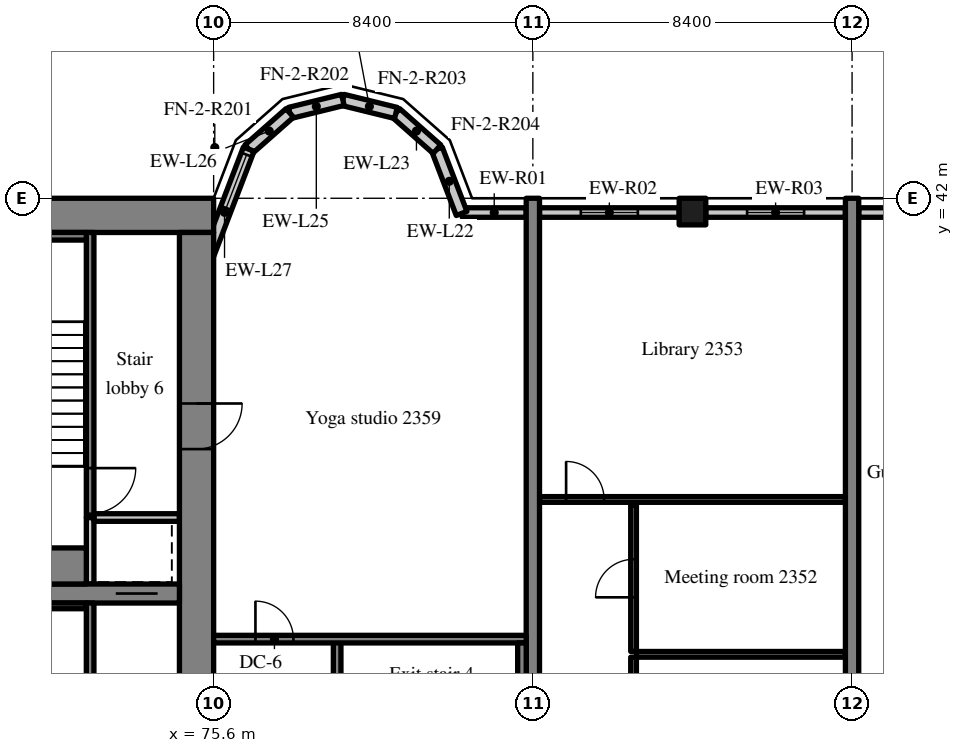
"""IFC4 building model, lengths in metres.
Left out: names, types, materials, properties, quantities, classifications, styles, units other than length and angle.
Written with IfcOpenShell. Run it as: python <this file> out.ifc"""

import sys

from ifc_helpers import new_model, si_unit, direction, frame, frame_2d, origin, origin_2d, place, context, subcontext, project, spatial, rectangle, extrude, source, transform, mapped, element, fill, save


model = new_model("IFC4")
c1 = context("Model", 3, precision=1e-05, world=origin(), true_north=direction((0.0, 1.0)))
c2 = subcontext(c1, "Body", "Model", "MODEL_VIEW")
j1 = project(units=[si_unit("LENGTHUNIT", "METRE"), si_unit("PLANEANGLEUNIT", "RADIAN")], contexts=[c1])
p1 = place(None, origin())
s1 = spatial("IfcSite", under=j1, at=p1, CompositionType="ELEMENT")
p2 = place(p1, origin())
s2 = spatial("IfcBuilding", under=s1, at=p2, CompositionType="ELEMENT")
p3 = place(p2, frame((0.0, 0.0, 99.0)))
s3 = spatial("IfcBuildingStorey", under=s2, at=p3, CompositionType="ELEMENT", Elevation=99.0)
m1 = source(origin(), c2, "Body", "SweptSolid", [
    extrude(rectangle(XDim=50.4, YDim=0.9, at=frame_2d((25.2, 0.0))), origin(), (0.0, 0.0, 1.0), 3.52),
])
p4 = place(p3, frame((25.2, 41.55, 0.0), z_axis=(0.0, 0.0, 1.0), x_axis=(1.0, 0.0, 0.0)))
e1 = element("IfcWall", 1, at=p4, inside=s3, PredefinedType="SHEAR", context=c2, shape_type="MappedRepresentation", body=[
    mapped(m1, transform((0.0, 0.0, 0.0), scale=1.0)),
])
m2 = source(origin(), c2, "Body", "SweptSolid", [
    extrude(rectangle(XDim=18.2, YDim=0.9, at=frame_2d((9.1, 0.0))), origin(), (0.0, 0.0, 1.0), 3.52),
])
p5 = place(p3, frame((75.15, 22.9, 0.0), z_axis=(0.0, 0.0, 1.0), x_axis=(0.0, 1.0, 0.0)))
e2 = element("IfcWall", 2, at=p5, inside=s3, PredefinedType="SHEAR", context=c2, shape_type="MappedRepresentation", body=[
    mapped(m2, transform((0.0, 0.0, 0.0), scale=1.0)),
])
m3 = source(origin(), c2, "Body", "SweptSolid", [
    extrude(rectangle(XDim=1.2, YDim=2.1, at=frame_2d((0.6, 1.05))), frame((0.0, 0.46, 0.0), z_axis=(0.0, -1.0, 0.0), x_axis=(1.0, 0.0, 0.0)), (0.0, 0.0, 1.0), 0.92),
])
p6 = place(p5, frame((12.5, 0.0, 0.0)))
e3 = element("IfcOpeningElement", 3, at=p6, cuts=e2, PredefinedType="OPENING", context=c2, shape_type="MappedRepresentation", body=[
    mapped(m3, transform((0.0, 0.0, 0.0), scale=1.0)),
])
m4 = source(origin(), c2, "Body", "SweptSolid", [
    extrude(rectangle(XDim=7.25, YDim=0.5, at=frame_2d((3.625, 0.0))), origin(), (0.0, 0.0, 1.0), 3.52),
])
p7 = place(p3, frame((67.45, 31.6, 0.0), z_axis=(0.0, 0.0, 1.0), x_axis=(1.0, 0.0, 0.0)))
e4 = element("IfcWall", 4, at=p7, inside=s3, PredefinedType="SHEAR", context=c2, shape_type="MappedRepresentation", body=[
    mapped(m4, transform((0.0, 0.0, 0.0), scale=1.0)),
])
m5 = source(origin(), c2, "Body", "SweptSolid", [
    extrude(rectangle(XDim=1.1, YDim=2.1, at=frame_2d((0.55, 1.05))), frame((0.0, 0.26, 0.0), z_axis=(0.0, -1.0, 0.0), x_axis=(1.0, 0.0, 0.0)), (0.0, 0.0, 1.0), 0.52),
])
p8 = place(p7, frame((5.575, 0.0, 0.0)))
e5 = element("IfcOpeningElement", 5, at=p8, cuts=e4, PredefinedType="OPENING", context=c2, shape_type="MappedRepresentation", body=[
    mapped(m5, transform((0.0, 0.0, 0.0), scale=1.0)),
])
m6 = source(origin(), c2, "Body", "SweptSolid", [
    extrude(rectangle(XDim=20.0, YDim=0.35, at=frame_2d((10.0, 0.0))), origin(), (0.0, 0.0, 1.0), 3.52),
])
for number, where, z_axis, x_axis in (
    (6, (84.0, 22.0, 0.0), (0.0, 0.0, 1.0), (0.0, 1.0, 0.0)),
    (7, (92.4, 22.0, 0.0), (0.0, 0.0, 1.0), (0.0, 1.0, 0.0)),
):
    element("IfcWall", number, at=place(p3, frame(where, z_axis=z_axis, x_axis=x_axis)), inside=s3, PredefinedType="SHEAR", context=c2, shape_type="MappedRepresentation", body=[
        mapped(m6, transform((0.0, 0.0, 0.0), scale=1.0)),
    ])
m7 = source(origin(), c2, "Body", "SweptSolid", [
    extrude(rectangle(XDim=0.7, YDim=0.7, at=origin_2d()), origin(), (0.0, 0.0, 1.0), 3.52),
])
p9 = place(p3, frame((88.2, 41.65, 0.0), z_axis=(0.0, 0.0, 1.0), x_axis=(1.0, 0.0, 0.0)))
e8 = element("IfcColumn", 8, at=p9, inside=s3, PredefinedType="COLUMN", context=c2, shape_type="MappedRepresentation", body=[
    mapped(m7, transform((0.0, 0.0, 0.0), scale=1.0)),
])
m8 = source(origin(), c2, "Body", "SweptSolid", [
    extrude(rectangle(XDim=1.683, YDim=0.25, at=frame_2d((0.841, 0.0))), origin(), (0.0, 0.0, 1.0), 2.82),
])
p10 = place(p3, frame((83.825, 41.625, 0.0), z_axis=(0.0, 0.0, 1.0), x_axis=(-1.0, 0.0, 0.0)))
e9 = element("IfcWall", 9, at=p10, inside=s3, PredefinedType="SOLIDWALL", context=c2, shape_type="MappedRepresentation", body=[
    mapped(m8, transform((0.0, 0.0, 0.0), scale=1.0)),
])
m9 = source(origin(), c2, "Body", "SweptSolid", [
    extrude(rectangle(XDim=3.675, YDim=0.25, at=frame_2d((1.837, 0.0))), origin(), (0.0, 0.0, 1.0), 2.82),
])
p11 = place(p3, frame((87.85, 41.625, 0.0), z_axis=(0.0, 0.0, 1.0), x_axis=(-1.0, 0.0, 0.0)))
e10 = element("IfcWall", 10, at=p11, inside=s3, PredefinedType="SOLIDWALL", context=c2, shape_type="MappedRepresentation", body=[
    mapped(m9, transform((0.0, 0.0, 0.0), scale=1.0)),
])
m10 = source(origin(), c2, "Body", "SweptSolid", [
    extrude(rectangle(XDim=1.5, YDim=1.5, at=frame_2d((0.75, 0.75))), frame((0.0, 0.135, 0.0), z_axis=(0.0, -1.0, 0.0), x_axis=(1.0, 0.0, 0.0)), (0.0, 0.0, 1.0), 0.27),
])
p12 = place(p11, frame((1.087, 0.0, 0.9)))
e11 = element("IfcOpeningElement", 11, at=p12, cuts=e10, PredefinedType="OPENING", context=c2, shape_type="MappedRepresentation", body=[
    mapped(m10, transform((0.0, 0.0, 0.0), scale=1.0)),
])
p13 = place(p3, frame((92.225, 41.625, 0.0), z_axis=(0.0, 0.0, 1.0), x_axis=(-1.0, 0.0, 0.0)))
e12 = element("IfcWall", 12, at=p13, inside=s3, PredefinedType="SOLIDWALL", context=c2, shape_type="MappedRepresentation", body=[
    mapped(m9, transform((0.0, 0.0, 0.0), scale=1.0)),
])
p14 = place(p13, frame((1.087, 0.0, 0.9)))
e13 = element("IfcOpeningElement", 13, at=p14, cuts=e12, PredefinedType="OPENING", context=c2, shape_type="MappedRepresentation", body=[
    mapped(m10, transform((0.0, 0.0, 0.0), scale=1.0)),
])
m11 = source(origin(), c2, "Body", "SweptSolid", [
    extrude(rectangle(XDim=4.07, YDim=0.25, at=frame_2d((2.035, 0.0))), origin(), (0.0, 0.0, 1.0), 2.82),
])
p15 = place(p3, frame((96.645, 41.625, 0.0), z_axis=(0.0, 0.0, 1.0), x_axis=(-1.0, 0.0, 0.0)))
e14 = element("IfcWall", 14, at=p15, inside=s3, PredefinedType="SOLIDWALL", context=c2, shape_type="MappedRepresentation", body=[
    mapped(m11, transform((0.0, 0.0, 0.0), scale=1.0)),
])
p16 = place(p15, frame((1.285, 0.0, 0.9)))
e15 = element("IfcOpeningElement", 15, at=p16, cuts=e14, PredefinedType="OPENING", context=c2, shape_type="MappedRepresentation", body=[
    mapped(m10, transform((0.0, 0.0, 0.0), scale=1.0)),
])
m12 = source(origin(), c2, "Body", "SweptSolid", [
    extrude(rectangle(XDim=1.812, YDim=0.3, at=frame_2d((0.906, 0.0))), origin(), (0.0, 0.0, 1.0), 3.52),
])
p17 = place(p3, frame((82.125, 41.6, 0.0), z_axis=(0.0, 0.0, 1.0), x_axis=(-0.357877270961, 0.93376863244, 0.0)))
e16 = element("IfcWall", 16, at=p17, inside=s3, PredefinedType="SOLIDWALL", context=c2, shape_type="MappedRepresentation", body=[
    mapped(m12, transform((0.0, 0.0, 0.0), scale=1.0)),
])
m13 = source(origin(), c2, "Body", "SweptSolid", [
    extrude(rectangle(XDim=1.44, YDim=0.3, at=frame_2d((0.72, 0.0))), origin(), (0.0, 0.0, 1.0), 3.52),
])
p18 = place(p3, frame((81.477, 43.292, 0.0), z_axis=(0.0, 0.0, 1.0), x_axis=(-0.74957555648, 0.661918790432, 0.0)))
e17 = element("IfcWall", 17, at=p18, inside=s3, PredefinedType="SOLIDWALL", context=c2, shape_type="MappedRepresentation", body=[
    mapped(m13, transform((0.0, 0.0, 0.0), scale=1.0)),
])
m14 = source(origin(), c2, "Body", "SweptSolid", [
    extrude(rectangle(XDim=1.439, YDim=0.3, at=frame_2d((0.719, 0.0))), origin(), (0.0, 0.0, 1.0), 3.52),
])
for number, where, z_axis, x_axis in (
    (18, (80.397, 44.245, 0.0), (0.0, 0.0, 1.0), (-0.971, 0.238, 0.0)),
    (19, (79.0, 44.588, 0.0), (0.0, 0.0, 1.0), (-0.971, -0.238, 0.0)),
):
    element("IfcWall", number, at=place(p3, frame(where, z_axis=z_axis, x_axis=x_axis)), inside=s3, PredefinedType="SOLIDWALL", context=c2, shape_type="MappedRepresentation", body=[
        mapped(m14, transform((0.0, 0.0, 0.0), scale=1.0)),
    ])
p19 = place(p3, frame((77.603, 44.245, 0.0), z_axis=(0.0, 0.0, 1.0), x_axis=(-0.74957555648, -0.661918790432, 0.0)))
e20 = element("IfcWall", 20, at=p19, inside=s3, PredefinedType="SOLIDWALL", context=c2, shape_type="MappedRepresentation", body=[
    mapped(m13, transform((0.0, 0.0, 0.0), scale=1.0)),
])
m15 = source(origin(), c2, "Body", "SweptSolid", [
    extrude(rectangle(XDim=3.559, YDim=0.3, at=frame_2d((1.78, 0.0))), origin(), (0.0, 0.0, 1.0), 3.52),
])
p20 = place(p3, frame((76.523, 43.292, 0.0), z_axis=(0.0, 0.0, 1.0), x_axis=(-0.35779745313, -0.933799219604, 0.0)))
e21 = element("IfcWall", 21, at=p20, inside=s3, PredefinedType="SOLIDWALL", context=c2, shape_type="MappedRepresentation", body=[
    mapped(m15, transform((0.0, 0.0, 0.0), scale=1.0)),
])
m16 = source(origin(), c2, "Body", "SweptSolid", [
    extrude(rectangle(XDim=1.5, YDim=2.0, at=frame_2d((0.75, 1.0))), frame((0.0, 0.16, 0.0), z_axis=(0.0, -1.0, 0.0), x_axis=(1.0, 0.0, 0.0)), (0.0, 0.0, 1.0), 0.32),
])
p21 = place(p20, frame((0.156, 0.0, 0.9)))
e22 = element("IfcOpeningElement", 22, at=p21, cuts=e21, PredefinedType="OPENING", context=c2, shape_type="MappedRepresentation", body=[
    mapped(m16, transform((0.0, 0.0, 0.0), scale=1.0)),
])
m17 = source(origin(), c2, "Body", "SweptSolid", [
    extrude(rectangle(XDim=8.45, YDim=0.2, at=frame_2d((4.225, 0.0))), origin(), (0.0, 0.0, 1.0), 3.52),
])
p22 = place(p3, frame((72.35, 22.9, 0.0), z_axis=(0.0, 0.0, 1.0), x_axis=(0.0, 1.0, 0.0)))
e23 = element("IfcWall", 23, at=p22, inside=s3, PredefinedType="SOLIDWALL", context=c2, shape_type="MappedRepresentation", body=[
    mapped(m17, transform((0.0, 0.0, 0.0), scale=1.0)),
])
m18 = source(origin(), c2, "Body", "SweptSolid", [
    extrude(rectangle(XDim=1.2, YDim=2.1, at=frame_2d((0.6, 1.05))), frame((0.0, 0.11, 0.0), z_axis=(0.0, -1.0, 0.0), x_axis=(1.0, 0.0, 0.0)), (0.0, 0.0, 1.0), 0.22),
])
p23 = place(p22, frame((0.7, 0.0, 0.0)))
e24 = element("IfcOpeningElement", 24, at=p23, cuts=e23, PredefinedType="OPENING", context=c2, shape_type="MappedRepresentation", body=[
    mapped(m18, transform((0.0, 0.0, 0.0), scale=1.0)),
])
m19 = source(origin(), c2, "Body", "SweptSolid", [
    extrude(rectangle(XDim=1.75, YDim=0.2, at=frame_2d((0.875, 0.0))), origin(), (0.0, 0.0, 1.0), 3.52),
])
p24 = place(p3, frame((72.35, 31.85, 0.0), z_axis=(0.0, 0.0, 1.0), x_axis=(0.0, 1.0, 0.0)))
e25 = element("IfcWall", 25, at=p24, inside=s3, PredefinedType="SOLIDWALL", context=c2, shape_type="MappedRepresentation", body=[
    mapped(m19, transform((0.0, 0.0, 0.0), scale=1.0)),
])
m20 = source(origin(), c2, "Body", "SweptSolid", [
    extrude(rectangle(XDim=2.25, YDim=0.2, at=frame_2d((1.125, 0.0))), origin(), (0.0, 0.0, 1.0), 3.52),
])
p25 = place(p3, frame((72.45, 33.6, 0.0), z_axis=(0.0, 0.0, 1.0), x_axis=(1.0, 0.0, 0.0)))
e26 = element("IfcWall", 26, at=p25, inside=s3, PredefinedType="SOLIDWALL", context=c2, shape_type="MappedRepresentation", body=[
    mapped(m20, transform((0.0, 0.0, 0.0), scale=1.0)),
])
m21 = source(origin(), c2, "Body", "SweptSolid", [
    extrude(rectangle(XDim=7.5, YDim=0.2, at=frame_2d((3.75, 0.0))), origin(), (0.0, 0.0, 1.0), 3.52),
])
p26 = place(p3, frame((72.35, 33.6, 0.0), z_axis=(0.0, 0.0, 1.0), x_axis=(0.0, 1.0, 0.0)))
e27 = element("IfcWall", 27, at=p26, inside=s3, PredefinedType="SOLIDWALL", context=c2, shape_type="MappedRepresentation", body=[
    mapped(m21, transform((0.0, 0.0, 0.0), scale=1.0)),
])
p27 = place(p26, frame((0.1, 0.0, 0.0)))
e28 = element("IfcOpeningElement", 28, at=p27, cuts=e27, PredefinedType="OPENING", context=c2, shape_type="MappedRepresentation", body=[
    mapped(m18, transform((0.0, 0.0, 0.0), scale=1.0)),
])
m22 = source(origin(), c2, "Body", "SweptSolid", [
    extrude(rectangle(XDim=8.3, YDim=0.2, at=frame_2d((4.15, 0.0))), origin(), (0.0, 0.0, 1.0), 3.52),
])
p28 = place(p3, frame((78.85, 22.1, 0.0), z_axis=(0.0, 0.0, 1.0), x_axis=(0.0, 1.0, 0.0)))
e29 = element("IfcWall", 29, at=p28, inside=s3, PredefinedType="SOLIDWALL", context=c2, shape_type="MappedRepresentation", body=[
    mapped(m22, transform((0.0, 0.0, 0.0), scale=1.0)),
])
p29 = place(p28, frame((0.6, 0.0, 0.0)))
e30 = element("IfcOpeningElement", 30, at=p29, cuts=e29, PredefinedType="OPENING", context=c2, shape_type="MappedRepresentation", body=[
    mapped(m18, transform((0.0, 0.0, 0.0), scale=1.0)),
])
m23 = source(origin(), c2, "Body", "SweptSolid", [
    extrude(rectangle(XDim=8.225, YDim=0.2, at=frame_2d((4.112, 0.0))), origin(), (0.0, 0.0, 1.0), 3.52),
])
p30 = place(p3, frame((83.825, 30.4, 0.0), z_axis=(0.0, 0.0, 1.0), x_axis=(-1.0, 0.0, 0.0)))
e31 = element("IfcWall", 31, at=p30, inside=s3, PredefinedType="SOLIDWALL", context=c2, shape_type="MappedRepresentation", body=[
    mapped(m23, transform((0.0, 0.0, 0.0), scale=1.0)),
])
m24 = source(origin(), c2, "Body", "SweptSolid", [
    extrude(rectangle(XDim=1.0, YDim=2.1, at=frame_2d((0.5, 1.05))), frame((0.0, 0.11, 0.0), z_axis=(0.0, -1.0, 0.0), x_axis=(1.0, 0.0, 0.0)), (0.0, 0.0, 1.0), 0.22),
])
p31 = place(p30, frame((6.125, 0.0, 0.0)))
e32 = element("IfcOpeningElement", 32, at=p31, cuts=e31, PredefinedType="OPENING", context=c2, shape_type="MappedRepresentation", body=[
    mapped(m24, transform((0.0, 0.0, 0.0), scale=1.0)),
])
m25 = source(origin(), c2, "Body", "SweptSolid", [
    extrude(rectangle(XDim=4.8, YDim=0.15, at=frame_2d((2.4, 0.0))), origin(), (0.0, 0.0, 1.0), 3.52),
])
p32 = place(p3, frame((67.45, 31.275, 0.0), z_axis=(0.0, 0.0, 1.0), x_axis=(1.0, 0.0, 0.0)))
e33 = element("IfcWall", 33, at=p32, inside=s3, PredefinedType="SOLIDWALL", context=c2, shape_type="MappedRepresentation", body=[
    mapped(m25, transform((0.0, 0.0, 0.0), scale=1.0)),
])
m26 = source(origin(), c2, "Body", "SweptSolid", [
    extrude(rectangle(XDim=4.8, YDim=0.2, at=frame_2d((2.4, 0.0))), origin(), (0.0, 0.0, 1.0), 3.52),
])
p33 = place(p3, frame((67.45, 41.0, 0.0), z_axis=(0.0, 0.0, 1.0), x_axis=(1.0, 0.0, 0.0)))
e34 = element("IfcWall", 34, at=p33, inside=s3, PredefinedType="SOLIDWALL", context=c2, shape_type="MappedRepresentation", body=[
    mapped(m26, transform((0.0, 0.0, 0.0), scale=1.0)),
])
m27 = source(origin(), c2, "Body", "SweptSolid", [
    extrude(rectangle(XDim=4.8, YDim=0.95, at=frame_2d((2.4, 0.0))), origin(), (0.0, 0.0, 1.0), 3.52),
])
p34 = place(p3, frame((67.45, 32.325, 0.0), z_axis=(0.0, 0.0, 1.0), x_axis=(1.0, 0.0, 0.0)))
e35 = element("IfcWall", 35, at=p34, inside=s3, PredefinedType="SOLIDWALL", context=c2, shape_type="MappedRepresentation", body=[
    mapped(m27, transform((0.0, 0.0, 0.0), scale=1.0)),
])
m28 = source(origin(), c2, "Body", "SweptSolid", [
    extrude(rectangle(XDim=8.1, YDim=0.225, at=frame_2d((4.05, 0.0))), origin(), (0.0, 0.0, 1.0), 3.52),
])
p35 = place(p3, frame((83.713, 22.2, 0.0), z_axis=(0.0, 0.0, 1.0), x_axis=(0.0, 1.0, 0.0)))
e36 = element("IfcWall", 36, at=p35, inside=s3, PredefinedType="SOLIDWALL", context=c2, shape_type="MappedRepresentation", body=[
    mapped(m28, transform((0.0, 0.0, 0.0), scale=1.0)),
])
m29 = source(origin(), c2, "Body", "SweptSolid", [
    extrude(rectangle(XDim=3.25, YDim=0.15, at=frame_2d((1.625, 0.0))), origin(), (0.0, 0.0, 1.0), 3.52),
])
p36 = place(p3, frame((86.65, 26.675, 0.0), z_axis=(0.0, 0.0, 1.0), x_axis=(0.0, 1.0, 0.0)))
e37 = element("IfcWall", 37, at=p36, inside=s3, PredefinedType="PARTITIONING", context=c2, shape_type="MappedRepresentation", body=[
    mapped(m29, transform((0.0, 0.0, 0.0), scale=1.0)),
])
m30 = source(origin(), c2, "Body", "SweptSolid", [
    extrude(rectangle(XDim=1.0, YDim=2.1, at=frame_2d((0.5, 1.05))), frame((0.0, 0.085, 0.0), z_axis=(0.0, -1.0, 0.0), x_axis=(1.0, 0.0, 0.0)), (0.0, 0.0, 1.0), 0.17),
])
p37 = place(p36, frame((1.125, 0.0, 0.0)))
e38 = element("IfcOpeningElement", 38, at=p37, cuts=e37, PredefinedType="OPENING", context=c2, shape_type="MappedRepresentation", body=[
    mapped(m30, transform((0.0, 0.0, 0.0), scale=1.0)),
])
m31 = source(origin(), c2, "Body", "SweptSolid", [
    extrude(rectangle(XDim=5.5, YDim=0.15, at=frame_2d((2.75, 0.0))), origin(), (0.0, 0.0, 1.0), 3.52),
])
p38 = place(p3, frame((86.725, 30.0, 0.0), z_axis=(0.0, 0.0, 1.0), x_axis=(1.0, 0.0, 0.0)))
e39 = element("IfcWall", 39, at=p38, inside=s3, PredefinedType="PARTITIONING", context=c2, shape_type="MappedRepresentation", body=[
    mapped(m31, transform((0.0, 0.0, 0.0), scale=1.0)),
])
m32 = source(origin(), c2, "Body", "SweptSolid", [
    extrude(rectangle(XDim=3.85, YDim=0.15, at=frame_2d((1.925, 0.0))), origin(), (0.0, 0.0, 1.0), 3.52),
])
p39 = place(p3, frame((86.65, 30.075, 0.0), z_axis=(0.0, 0.0, 1.0), x_axis=(0.0, 1.0, 0.0)))
e40 = element("IfcWall", 40, at=p39, inside=s3, PredefinedType="PARTITIONING", context=c2, shape_type="MappedRepresentation", body=[
    mapped(m32, transform((0.0, 0.0, 0.0), scale=1.0)),
])
p40 = place(p39, frame((1.425, 0.0, 0.0)))
e41 = element("IfcOpeningElement", 41, at=p40, cuts=e40, PredefinedType="OPENING", context=c2, shape_type="MappedRepresentation", body=[
    mapped(m30, transform((0.0, 0.0, 0.0), scale=1.0)),
])
m33 = source(origin(), c2, "Body", "SweptSolid", [
    extrude(rectangle(XDim=8.05, YDim=0.15, at=frame_2d((4.025, 0.0))), origin(), (0.0, 0.0, 1.0), 3.52),
])
p41 = place(p3, frame((84.175, 34.075, 0.0), z_axis=(0.0, 0.0, 1.0), x_axis=(1.0, 0.0, 0.0)))
e42 = element("IfcWall", 42, at=p41, inside=s3, PredefinedType="PARTITIONING", context=c2, shape_type="MappedRepresentation", body=[
    mapped(m33, transform((0.0, 0.0, 0.0), scale=1.0)),
])
p42 = place(p41, frame((0.7, 0.0, 0.0)))
e43 = element("IfcOpeningElement", 43, at=p42, cuts=e42, PredefinedType="OPENING", context=c2, shape_type="MappedRepresentation", body=[
    mapped(m30, transform((0.0, 0.0, 0.0), scale=1.0)),
])
m34 = source(origin(), c2, "Body", "SweptSolid", [
    extrude(rectangle(XDim=1.5, YDim=1.5, at=frame_2d((0.75, 0.75))), frame((0.0, 0.03, 0.0), z_axis=(0.0, -1.0, 0.0), x_axis=(1.0, 0.0, 0.0)), (0.0, 0.0, 1.0), 0.06),
])
p43 = place(p12, origin())
e44 = element("IfcWindow", 44, at=p43, inside=s3, PartitioningType="SINGLE_PANEL", PredefinedType="WINDOW", context=c2, shape_type="MappedRepresentation", body=[
    mapped(m34, transform((0.0, 0.0, 0.0), scale=1.0)),
])
fill(e11, e44)
p44 = place(p14, origin())
e45 = element("IfcWindow", 45, at=p44, inside=s3, PartitioningType="SINGLE_PANEL", PredefinedType="WINDOW", context=c2, shape_type="MappedRepresentation", body=[
    mapped(m34, transform((0.0, 0.0, 0.0), scale=1.0)),
])
fill(e13, e45)
m35 = source(origin(), c2, "Body", "SweptSolid", [
    extrude(rectangle(XDim=1.5, YDim=2.0, at=frame_2d((0.75, 1.0))), frame((0.0, 0.03, 0.0), z_axis=(0.0, -1.0, 0.0), x_axis=(1.0, 0.0, 0.0)), (0.0, 0.0, 1.0), 0.06),
])
p45 = place(p21, origin())
e46 = element("IfcWindow", 46, at=p45, inside=s3, PartitioningType="SINGLE_PANEL", PredefinedType="WINDOW", context=c2, shape_type="MappedRepresentation", body=[
    mapped(m35, transform((0.0, 0.0, 0.0), scale=1.0)),
])
fill(e22, e46)
m36 = source(origin(), c2, "Body", "SweptSolid", [
    extrude(rectangle(XDim=1.1, YDim=2.1, at=frame_2d((0.55, 1.05))), frame((0.0, 0.025, 0.0), z_axis=(0.0, -1.0, 0.0), x_axis=(1.0, 0.0, 0.0)), (0.0, 0.0, 1.0), 0.05),
])
p46 = place(p8, origin())
e47 = element("IfcDoor", 47, at=p46, inside=s3, OperationType="SLIDING_TO_RIGHT", PredefinedType="DOOR", context=c2, shape_type="MappedRepresentation", body=[
    mapped(m36, transform((0.0, 0.0, 0.0), scale=1.0)),
])
fill(e5, e47)
m37 = source(origin(), c2, "Body", "SweptSolid", [
    extrude(rectangle(XDim=1.2, YDim=2.1, at=frame_2d((0.6, 1.05))), frame((0.0, 0.025, 0.0), z_axis=(0.0, -1.0, 0.0), x_axis=(1.0, 0.0, 0.0)), (0.0, 0.0, 1.0), 0.05),
])
p47 = place(p27, origin())
e48 = element("IfcDoor", 48, at=p47, inside=s3, OperationType="SINGLE_SWING_RIGHT", PredefinedType="DOOR", context=c2, shape_type="MappedRepresentation", body=[
    mapped(m37, transform((0.0, 0.0, 0.0), scale=1.0)),
])
fill(e28, e48)
p48 = place(p6, origin())
e49 = element("IfcDoor", 49, at=p48, inside=s3, OperationType="SINGLE_SWING_RIGHT", PredefinedType="DOOR", context=c2, shape_type="MappedRepresentation", body=[
    mapped(m37, transform((0.0, 0.0, 0.0), scale=1.0)),
])
fill(e3, e49)
m38 = source(origin(), c2, "Body", "SweptSolid", [
    extrude(rectangle(XDim=1.0, YDim=2.1, at=frame_2d((0.5, 1.05))), frame((0.0, 0.025, 0.0), z_axis=(0.0, -1.0, 0.0), x_axis=(1.0, 0.0, 0.0)), (0.0, 0.0, 1.0), 0.05),
])
p49 = place(p31, origin())
e50 = element("IfcDoor", 50, at=p49, inside=s3, OperationType="SINGLE_SWING_RIGHT", PredefinedType="DOOR", context=c2, shape_type="MappedRepresentation", body=[
    mapped(m38, transform((0.0, 0.0, 0.0), scale=1.0)),
])
fill(e32, e50)
p50 = place(p40, origin())
e51 = element("IfcDoor", 51, at=p50, inside=s3, OperationType="SINGLE_SWING_LEFT", PredefinedType="DOOR", context=c2, shape_type="MappedRepresentation", body=[
    mapped(m38, transform((0.0, 0.0, 0.0), scale=1.0)),
])
fill(e41, e51)
p51 = place(p42, origin())
e52 = element("IfcDoor", 52, at=p51, inside=s3, OperationType="SINGLE_SWING_LEFT", PredefinedType="DOOR", context=c2, shape_type="MappedRepresentation", body=[
    mapped(m38, transform((0.0, 0.0, 0.0), scale=1.0)),
])
fill(e43, e52)
save(model, sys.argv[1])
